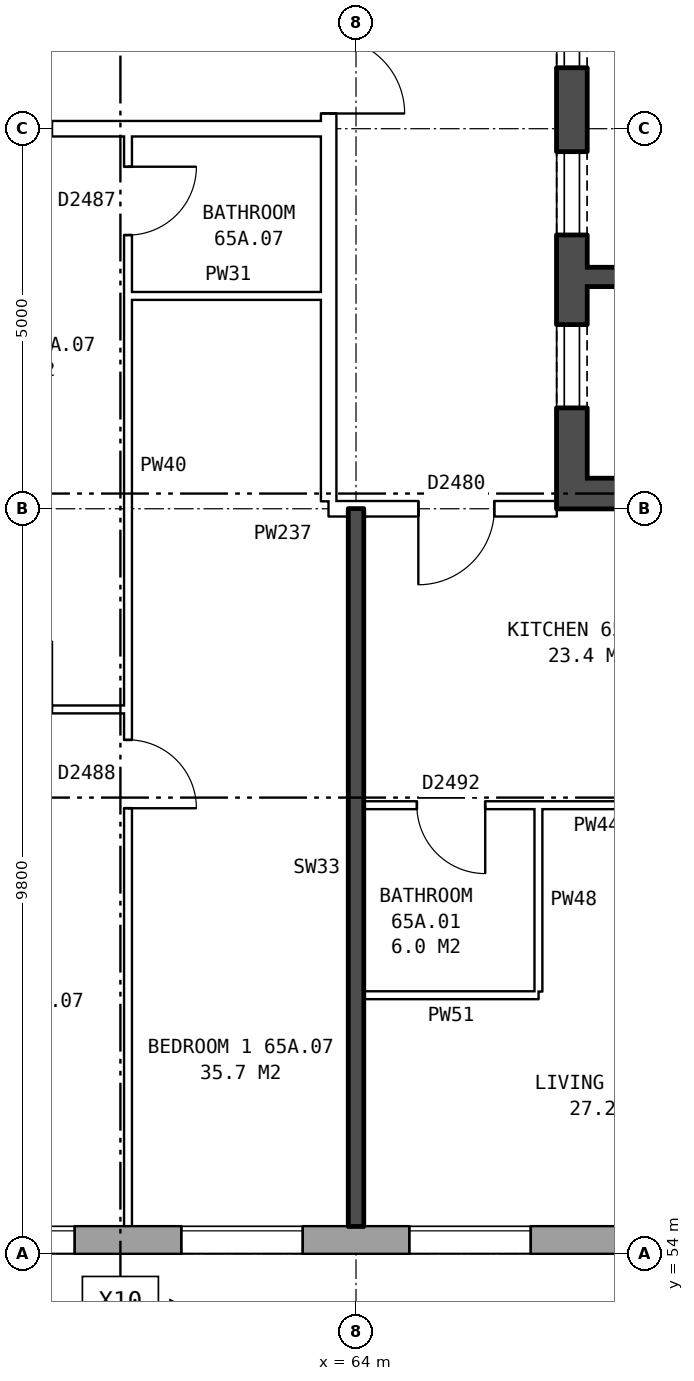
"""IFC4 building model, lengths in metres.
Left out: names, types, materials, properties, quantities, classifications, styles, units other than length and angle.
Written with IfcOpenShell. Run it as: python <this file> out.ifc"""

import sys

from ifc_helpers import new_model, si_unit, direction, frame, frame_2d, origin, place, context, subcontext, project, spatial, rectangle, extrude, element, fill, save


model = new_model("IFC4")
c1 = context("Model", 3, precision=1e-05, world=origin(), true_north=direction((0.0, 1.0)))
c2 = subcontext(c1, "Body", "Model", "MODEL_VIEW")
j1 = project(units=[si_unit("LENGTHUNIT", "METRE"), si_unit("PLANEANGLEUNIT", "RADIAN")], contexts=[c1])
p1 = place(None, origin())
s1 = spatial("IfcSite", under=j1, at=p1, CompositionType="ELEMENT")
p2 = place(p1, origin())
s2 = spatial("IfcBuilding", under=s1, at=p2, CompositionType="ELEMENT")
p3 = place(p2, frame((0.0, 0.0, 230.7)))
s3 = spatial("IfcBuildingStorey", under=s2, at=p3, CompositionType="ELEMENT", Elevation=230.7)
p4 = place(p3, frame((35.075, 54.18, 0.0), z_axis=(0.0, 0.0, 1.0), x_axis=(1.0, 0.0, 0.0)))
e1 = element("IfcWall", 1, at=p4, inside=s3, PredefinedType="STANDARD", context=c2, shape_type="SweptSolid", body=[
    extrude(rectangle(XDim=39.875, YDim=0.36, at=frame_2d((19.938, 0.0))), origin(), (0.0, 0.0, 1.0), 2.85),
])
p5 = place(p4, frame((2.625, 0.0, 0.8)))
e2 = element("IfcOpeningElement", 2, at=p5, cuts=e1, PredefinedType="OPENING", context=c2, shape_type="SweptSolid", body=[
    extrude(rectangle(XDim=1.6, YDim=1.8, at=frame_2d((0.8, 0.9))), frame((0.0, 0.19, 0.0), z_axis=(0.0, -1.0, 0.0), x_axis=(1.0, 0.0, 0.0)), (0.0, 0.0, 1.0), 0.38),
])
p6 = place(p4, frame((5.625, 0.0, 0.8)))
e3 = element("IfcOpeningElement", 3, at=p6, cuts=e1, PredefinedType="OPENING", context=c2, shape_type="SweptSolid", body=[
    extrude(rectangle(XDim=1.6, YDim=1.8, at=frame_2d((0.8, 0.9))), frame((0.0, 0.19, 0.0), z_axis=(0.0, -1.0, 0.0), x_axis=(1.0, 0.0, 0.0)), (0.0, 0.0, 1.0), 0.38),
])
p7 = place(p4, frame((8.625, 0.0, 0.8)))
e4 = element("IfcOpeningElement", 4, at=p7, cuts=e1, PredefinedType="OPENING", context=c2, shape_type="SweptSolid", body=[
    extrude(rectangle(XDim=1.6, YDim=1.8, at=frame_2d((0.8, 0.9))), frame((0.0, 0.19, 0.0), z_axis=(0.0, -1.0, 0.0), x_axis=(1.0, 0.0, 0.0)), (0.0, 0.0, 1.0), 0.38),
])
p8 = place(p4, frame((11.625, 0.0, 0.8)))
e5 = element("IfcOpeningElement", 5, at=p8, cuts=e1, PredefinedType="OPENING", context=c2, shape_type="SweptSolid", body=[
    extrude(rectangle(XDim=1.6, YDim=1.8, at=frame_2d((0.8, 0.9))), frame((0.0, 0.19, 0.0), z_axis=(0.0, -1.0, 0.0), x_axis=(1.0, 0.0, 0.0)), (0.0, 0.0, 1.0), 0.38),
])
p9 = place(p4, frame((14.075, 0.0, 0.8)))
e6 = element("IfcOpeningElement", 6, at=p9, cuts=e1, PredefinedType="OPENING", context=c2, shape_type="SweptSolid", body=[
    extrude(rectangle(XDim=1.0, YDim=1.8, at=frame_2d((0.5, 0.9))), frame((0.0, 0.19, 0.0), z_axis=(0.0, -1.0, 0.0), x_axis=(1.0, 0.0, 0.0)), (0.0, 0.0, 1.0), 0.38),
])
p10 = place(p4, frame((17.625, 0.0, 0.8)))
e7 = element("IfcOpeningElement", 7, at=p10, cuts=e1, PredefinedType="OPENING", context=c2, shape_type="SweptSolid", body=[
    extrude(rectangle(XDim=1.6, YDim=1.8, at=frame_2d((0.8, 0.9))), frame((0.0, 0.19, 0.0), z_axis=(0.0, -1.0, 0.0), x_axis=(1.0, 0.0, 0.0)), (0.0, 0.0, 1.0), 0.38),
])
p11 = place(p4, frame((20.125, 0.0, 0.8)))
e8 = element("IfcOpeningElement", 8, at=p11, cuts=e1, PredefinedType="OPENING", context=c2, shape_type="SweptSolid", body=[
    extrude(rectangle(XDim=0.6, YDim=1.2, at=frame_2d((0.3, 0.6))), frame((0.0, 0.19, 0.0), z_axis=(0.0, -1.0, 0.0), x_axis=(1.0, 0.0, 0.0)), (0.0, 0.0, 1.0), 0.38),
])
p12 = place(p4, frame((23.625, 0.0, 0.8)))
e9 = element("IfcOpeningElement", 9, at=p12, cuts=e1, PredefinedType="OPENING", context=c2, shape_type="SweptSolid", body=[
    extrude(rectangle(XDim=1.6, YDim=1.8, at=frame_2d((0.8, 0.9))), frame((0.0, 0.19, 0.0), z_axis=(0.0, -1.0, 0.0), x_axis=(1.0, 0.0, 0.0)), (0.0, 0.0, 1.0), 0.38),
])
p13 = place(p4, frame((26.625, 0.0, 0.8)))
e10 = element("IfcOpeningElement", 10, at=p13, cuts=e1, PredefinedType="OPENING", context=c2, shape_type="SweptSolid", body=[
    extrude(rectangle(XDim=1.6, YDim=1.8, at=frame_2d((0.8, 0.9))), frame((0.0, 0.19, 0.0), z_axis=(0.0, -1.0, 0.0), x_axis=(1.0, 0.0, 0.0)), (0.0, 0.0, 1.0), 0.38),
])
p14 = place(p4, frame((29.625, 0.0, 0.8)))
e11 = element("IfcOpeningElement", 11, at=p14, cuts=e1, PredefinedType="OPENING", context=c2, shape_type="SweptSolid", body=[
    extrude(rectangle(XDim=1.6, YDim=1.8, at=frame_2d((0.8, 0.9))), frame((0.0, 0.19, 0.0), z_axis=(0.0, -1.0, 0.0), x_axis=(1.0, 0.0, 0.0)), (0.0, 0.0, 1.0), 0.38),
])
p15 = place(p4, frame((32.625, 0.0, 0.8)))
e12 = element("IfcOpeningElement", 12, at=p15, cuts=e1, PredefinedType="OPENING", context=c2, shape_type="SweptSolid", body=[
    extrude(rectangle(XDim=1.6, YDim=1.8, at=frame_2d((0.8, 0.9))), frame((0.0, 0.19, 0.0), z_axis=(0.0, -1.0, 0.0), x_axis=(1.0, 0.0, 0.0)), (0.0, 0.0, 1.0), 0.38),
])
p16 = place(p4, frame((35.625, 0.0, 0.8)))
e13 = element("IfcOpeningElement", 13, at=p16, cuts=e1, PredefinedType="OPENING", context=c2, shape_type="SweptSolid", body=[
    extrude(rectangle(XDim=1.6, YDim=1.8, at=frame_2d((0.8, 0.9))), frame((0.0, 0.19, 0.0), z_axis=(0.0, -1.0, 0.0), x_axis=(1.0, 0.0, 0.0)), (0.0, 0.0, 1.0), 0.38),
])
p17 = place(p4, frame((22.125, 0.0, 1.7)))
e14 = element("IfcOpeningElement", 14, at=p17, cuts=e1, PredefinedType="OPENING", context=c2, shape_type="SweptSolid", body=[
    extrude(rectangle(XDim=0.6, YDim=0.9, at=frame_2d((0.3, 0.45))), frame((0.0, 0.19, 0.0), z_axis=(0.0, -1.0, 0.0), x_axis=(1.0, 0.0, 0.0)), (0.0, 0.0, 1.0), 0.38),
])
p18 = place(p3, frame((66.84, 63.8, 0.0), z_axis=(0.0, 0.0, 1.0), x_axis=(0.0, 1.0, 0.0)))
e15 = element("IfcWall", 15, at=p18, inside=s3, PredefinedType="SHEAR", context=c2, shape_type="SweptSolid", body=[
    extrude(rectangle(XDim=12.4, YDim=0.4, at=frame_2d((6.2, 0.0))), origin(), (0.0, 0.0, 1.0), 2.85),
])
p19 = place(p18, frame((1.325, 0.0, 0.0)))
e16 = element("IfcOpeningElement", 16, at=p19, cuts=e15, PredefinedType="OPENING", context=c2, shape_type="SweptSolid", body=[
    extrude(rectangle(XDim=1.1, YDim=2.1, at=frame_2d((0.55, 1.05))), frame((0.0, 0.21, 0.0), z_axis=(0.0, -1.0, 0.0), x_axis=(1.0, 0.0, 0.0)), (0.0, 0.0, 1.0), 0.42),
])
p20 = place(p18, frame((3.6, 0.0, 0.0)))
e17 = element("IfcOpeningElement", 17, at=p20, cuts=e15, PredefinedType="OPENING", context=c2, shape_type="SweptSolid", body=[
    extrude(rectangle(XDim=1.1, YDim=2.1, at=frame_2d((0.55, 1.05))), frame((0.0, 0.21, 0.0), z_axis=(0.0, -1.0, 0.0), x_axis=(1.0, 0.0, 0.0)), (0.0, 0.0, 1.0), 0.42),
])
p21 = place(p18, frame((5.8, 0.0, 0.0)))
e18 = element("IfcOpeningElement", 18, at=p21, cuts=e15, PredefinedType="OPENING", context=c2, shape_type="SweptSolid", body=[
    extrude(rectangle(XDim=1.1, YDim=2.1, at=frame_2d((0.55, 1.05))), frame((0.0, 0.21, 0.0), z_axis=(0.0, -1.0, 0.0), x_axis=(1.0, 0.0, 0.0)), (0.0, 0.0, 1.0), 0.42),
])
p22 = place(p18, frame((8.0, 0.0, 0.0)))
e19 = element("IfcOpeningElement", 19, at=p22, cuts=e15, PredefinedType="OPENING", context=c2, shape_type="SweptSolid", body=[
    extrude(rectangle(XDim=1.1, YDim=2.1, at=frame_2d((0.55, 1.05))), frame((0.0, 0.21, 0.0), z_axis=(0.0, -1.0, 0.0), x_axis=(1.0, 0.0, 0.0)), (0.0, 0.0, 1.0), 0.42),
])
p23 = place(p18, frame((9.9, 0.0, 0.0)))
e20 = element("IfcOpeningElement", 20, at=p23, cuts=e15, PredefinedType="OPENING", context=c2, shape_type="SweptSolid", body=[
    extrude(rectangle(XDim=1.1, YDim=2.1, at=frame_2d((0.55, 1.05))), frame((0.0, 0.21, 0.0), z_axis=(0.0, -1.0, 0.0), x_axis=(1.0, 0.0, 0.0)), (0.0, 0.0, 1.0), 0.42),
])
p24 = place(p3, frame((67.04, 64.0, 0.0), z_axis=(0.0, 0.0, 1.0), x_axis=(1.0, 0.0, 0.0)))
e21 = element("IfcWall", 21, at=p24, inside=s3, PredefinedType="SHEAR", context=c2, shape_type="SweptSolid", body=[
    extrude(rectangle(XDim=8.2, YDim=0.4, at=frame_2d((4.1, 0.0))), origin(), (0.0, 0.0, 1.0), 2.85),
])
p25 = place(p3, frame((67.04, 66.85, 0.0), z_axis=(0.0, 0.0, 1.0), x_axis=(1.0, 0.0, 0.0)))
e22 = element("IfcWall", 22, at=p25, inside=s3, PredefinedType="SHEAR", context=c2, shape_type="SweptSolid", body=[
    extrude(rectangle(XDim=3.595, YDim=0.25, at=frame_2d((1.797, 0.0))), origin(), (0.0, 0.0, 1.0), 2.85),
])
p26 = place(p3, frame((63.64, 63.9, 0.0), z_axis=(0.0, 0.0, 1.0), x_axis=(0.0, 1.0, 0.0)))
e23 = element("IfcWall", 23, at=p26, inside=s3, PredefinedType="PARTITIONING", context=c2, shape_type="SweptSolid", body=[
    extrude(rectangle(XDim=12.2, YDim=0.2, at=frame_2d((6.1, 0.0))), origin(), (0.0, 0.0, 1.0), 2.85),
])
p27 = place(p26, frame((5.1, 0.0, 0.0)))
e24 = element("IfcOpeningElement", 24, at=p27, cuts=e23, PredefinedType="OPENING", context=c2, shape_type="SweptSolid", body=[
    extrude(rectangle(XDim=2.0, YDim=2.1, at=frame_2d((1.0, 1.05))), frame((0.0, 0.11, 0.0), z_axis=(0.0, -1.0, 0.0), x_axis=(1.0, 0.0, 0.0)), (0.0, 0.0, 1.0), 0.22),
])
p28 = place(p3, frame((64.1, 57.4, 0.0), z_axis=(0.0, 0.0, 1.0), x_axis=(1.0, 0.0, 0.0)))
e25 = element("IfcWall", 25, at=p28, inside=s3, PredefinedType="PARTITIONING", context=c2, shape_type="SweptSolid", body=[
    extrude(rectangle(XDim=2.3, YDim=0.1, at=frame_2d((1.15, 0.0))), origin(), (0.0, 0.0, 1.0), 2.85),
])
p29 = place(p3, frame((64.1, 59.9, 0.0), z_axis=(0.0, 0.0, 1.0), x_axis=(1.0, 0.0, 0.0)))
e26 = element("IfcWall", 26, at=p29, inside=s3, PredefinedType="PARTITIONING", context=c2, shape_type="SweptSolid", body=[
    extrude(rectangle(XDim=5.8, YDim=0.1, at=frame_2d((2.9, 0.0))), origin(), (0.0, 0.0, 1.0), 2.85),
])
p30 = place(p29, frame((3.6, 0.0, 0.0)))
e27 = element("IfcOpeningElement", 27, at=p30, cuts=e26, PredefinedType="OPENING", context=c2, shape_type="SweptSolid", body=[
    extrude(rectangle(XDim=0.9, YDim=2.1, at=frame_2d((0.45, 1.05))), frame((0.0, 0.06, 0.0), z_axis=(0.0, -1.0, 0.0), x_axis=(1.0, 0.0, 0.0)), (0.0, 0.0, 1.0), 0.12),
])
p31 = place(p29, frame((0.7, 0.0, 0.0)))
e28 = element("IfcOpeningElement", 28, at=p31, cuts=e26, PredefinedType="OPENING", context=c2, shape_type="SweptSolid", body=[
    extrude(rectangle(XDim=0.9, YDim=2.1, at=frame_2d((0.45, 1.05))), frame((0.0, 0.06, 0.0), z_axis=(0.0, -1.0, 0.0), x_axis=(1.0, 0.0, 0.0)), (0.0, 0.0, 1.0), 0.12),
])
p32 = place(p3, frame((58.1, 61.16, 0.0), z_axis=(0.0, 0.0, 1.0), x_axis=(1.0, 0.0, 0.0)))
e29 = element("IfcWall", 29, at=p32, inside=s3, PredefinedType="PARTITIONING", context=c2, shape_type="SweptSolid", body=[
    extrude(rectangle(XDim=2.9, YDim=0.1, at=frame_2d((1.45, 0.0))), origin(), (0.0, 0.0, 1.0), 2.85),
])
p33 = place(p32, frame((1.0, 0.0, 0.0)))
e30 = element("IfcOpeningElement", 30, at=p33, cuts=e29, PredefinedType="OPENING", context=c2, shape_type="SweptSolid", body=[
    extrude(rectangle(XDim=0.9, YDim=2.1, at=frame_2d((0.45, 1.05))), frame((0.0, 0.06, 0.0), z_axis=(0.0, -1.0, 0.0), x_axis=(1.0, 0.0, 0.0)), (0.0, 0.0, 1.0), 0.12),
])
p34 = place(p3, frame((63.64, 63.8, 0.0), z_axis=(0.0, 0.0, 1.0), x_axis=(1.0, 0.0, 0.0)))
e31 = element("IfcWall", 31, at=p34, inside=s3, PredefinedType="PARTITIONING", context=c2, shape_type="SweptSolid", body=[
    extrude(rectangle(XDim=3.0, YDim=0.2, at=frame_2d((1.5, 0.0))), origin(), (0.0, 0.0, 1.0), 2.85),
])
p35 = place(p34, frame((1.18, 0.0, 0.0)))
e32 = element("IfcOpeningElement", 32, at=p35, cuts=e31, PredefinedType="OPENING", context=c2, shape_type="SweptSolid", body=[
    extrude(rectangle(XDim=1.0, YDim=2.1, at=frame_2d((0.5, 1.05))), frame((0.0, 0.11, 0.0), z_axis=(0.0, -1.0, 0.0), x_axis=(1.0, 0.0, 0.0)), (0.0, 0.0, 1.0), 0.22),
])
p36 = place(p3, frame((61.0, 66.6, 0.0), z_axis=(0.0, 0.0, 1.0), x_axis=(1.0, 0.0, 0.0)))
e33 = element("IfcWall", 33, at=p36, inside=s3, PredefinedType="PARTITIONING", context=c2, shape_type="SweptSolid", body=[
    extrude(rectangle(XDim=2.64, YDim=0.1, at=frame_2d((1.32, 0.0))), origin(), (0.0, 0.0, 1.0), 2.85),
])
p37 = place(p3, frame((44.36, 68.8, 0.0), z_axis=(0.0, 0.0, 1.0), x_axis=(1.0, 0.0, 0.0)))
e34 = element("IfcWall", 34, at=p37, inside=s3, PredefinedType="PARTITIONING", context=c2, shape_type="SweptSolid", body=[
    extrude(rectangle(XDim=19.28, YDim=0.2, at=frame_2d((9.64, 0.0))), origin(), (0.0, 0.0, 1.0), 2.85),
])
p38 = place(p37, frame((14.64, 0.0, 0.0)))
e35 = element("IfcOpeningElement", 35, at=p38, cuts=e34, PredefinedType="OPENING", context=c2, shape_type="SweptSolid", body=[
    extrude(rectangle(XDim=1.0, YDim=2.1, at=frame_2d((0.5, 1.05))), frame((0.0, 0.11, 0.0), z_axis=(0.0, -1.0, 0.0), x_axis=(1.0, 0.0, 0.0)), (0.0, 0.0, 1.0), 0.22),
])
p39 = place(p37, frame((5.64, 0.0, 0.0)))
e36 = element("IfcOpeningElement", 36, at=p39, cuts=e34, PredefinedType="OPENING", context=c2, shape_type="SweptSolid", body=[
    extrude(rectangle(XDim=1.0, YDim=2.1, at=frame_2d((0.5, 1.05))), frame((0.0, 0.11, 0.0), z_axis=(0.0, -1.0, 0.0), x_axis=(1.0, 0.0, 0.0)), (0.0, 0.0, 1.0), 0.22),
])
p40 = place(p3, frame((61.0, 54.36, 0.0), z_axis=(0.0, 0.0, 1.0), x_axis=(0.0, 1.0, 0.0)))
e37 = element("IfcWall", 37, at=p40, inside=s3, PredefinedType="PARTITIONING", context=c2, shape_type="SweptSolid", body=[
    extrude(rectangle(XDim=14.34, YDim=0.1, at=frame_2d((7.17, 0.0))), origin(), (0.0, 0.0, 1.0), 2.85),
])
p41 = place(p40, frame((5.5, 0.0, 0.0)))
e38 = element("IfcOpeningElement", 38, at=p41, cuts=e37, PredefinedType="OPENING", context=c2, shape_type="SweptSolid", body=[
    extrude(rectangle(XDim=0.9, YDim=2.1, at=frame_2d((0.45, 1.05))), frame((0.0, 0.06, 0.0), z_axis=(0.0, -1.0, 0.0), x_axis=(1.0, 0.0, 0.0)), (0.0, 0.0, 1.0), 0.12),
])
p42 = place(p40, frame((13.04, 0.0, 0.0)))
e39 = element("IfcOpeningElement", 39, at=p42, cuts=e37, PredefinedType="OPENING", context=c2, shape_type="SweptSolid", body=[
    extrude(rectangle(XDim=0.9, YDim=2.1, at=frame_2d((0.45, 1.05))), frame((0.0, 0.06, 0.0), z_axis=(0.0, -1.0, 0.0), x_axis=(1.0, 0.0, 0.0)), (0.0, 0.0, 1.0), 0.12),
])
p43 = place(p3, frame((64.0, 54.36, 0.0), z_axis=(0.0, 0.0, 1.0), x_axis=(0.0, 1.0, 0.0)))
e40 = element("IfcWall", 40, at=p43, inside=s3, PredefinedType="SOLIDWALL", context=c2, shape_type="SweptSolid", body=[
    extrude(rectangle(XDim=9.44, YDim=0.2, at=frame_2d((4.72, 0.0))), origin(), (0.0, 0.0, 1.0), 2.85),
])
p44 = place(p3, frame((66.4, 57.45, 0.0), z_axis=(0.0, 0.0, 1.0), x_axis=(0.0, 1.0, 0.0)))
e41 = element("IfcWall", 41, at=p44, inside=s3, PredefinedType="PARTITIONING", context=c2, shape_type="SweptSolid", body=[
    extrude(rectangle(XDim=2.4, YDim=0.1, at=frame_2d((1.2, 0.0))), origin(), (0.0, 0.0, 1.0), 2.85),
])
p45 = place(p12, origin())
e42 = element("IfcWindow", 42, at=p45, inside=s3, PartitioningType="SINGLE_PANEL", PredefinedType="WINDOW", context=c2, shape_type="SweptSolid", body=[
    extrude(rectangle(XDim=1.6, YDim=1.8, at=frame_2d((0.8, 0.9))), frame((0.0, 0.15, 0.0), z_axis=(0.0, -1.0, 0.0), x_axis=(1.0, 0.0, 0.0)), (0.0, 0.0, 1.0), 0.06),
])
fill(e9, e42)
p46 = place(p13, origin())
e43 = element("IfcWindow", 43, at=p46, inside=s3, PartitioningType="SINGLE_PANEL", PredefinedType="WINDOW", context=c2, shape_type="SweptSolid", body=[
    extrude(rectangle(XDim=1.6, YDim=1.8, at=frame_2d((0.8, 0.9))), frame((0.0, 0.15, 0.0), z_axis=(0.0, -1.0, 0.0), x_axis=(1.0, 0.0, 0.0)), (0.0, 0.0, 1.0), 0.06),
])
fill(e10, e43)
p47 = place(p14, origin())
e44 = element("IfcWindow", 44, at=p47, inside=s3, PartitioningType="SINGLE_PANEL", PredefinedType="WINDOW", context=c2, shape_type="SweptSolid", body=[
    extrude(rectangle(XDim=1.6, YDim=1.8, at=frame_2d((0.8, 0.9))), frame((0.0, 0.15, 0.0), z_axis=(0.0, -1.0, 0.0), x_axis=(1.0, 0.0, 0.0)), (0.0, 0.0, 1.0), 0.06),
])
fill(e11, e44)
p48 = place(p19, origin())
e45 = element("IfcDoor", 45, at=p48, inside=s3, OperationType="DOUBLE_DOOR_SLIDING", PredefinedType="DOOR", context=c2, shape_type="SweptSolid", body=[
    extrude(rectangle(XDim=1.1, YDim=2.1, at=frame_2d((0.55, 1.05))), frame((0.0, -0.135, 0.0), z_axis=(0.0, -1.0, 0.0), x_axis=(1.0, 0.0, 0.0)), (0.0, 0.0, 1.0), 0.05),
])
fill(e16, e45)
p49 = place(p20, origin())
e46 = element("IfcDoor", 46, at=p49, inside=s3, OperationType="DOUBLE_DOOR_SLIDING", PredefinedType="DOOR", context=c2, shape_type="SweptSolid", body=[
    extrude(rectangle(XDim=1.1, YDim=2.1, at=frame_2d((0.55, 1.05))), frame((0.0, -0.135, 0.0), z_axis=(0.0, -1.0, 0.0), x_axis=(1.0, 0.0, 0.0)), (0.0, 0.0, 1.0), 0.05),
])
fill(e17, e46)
p50 = place(p21, origin())
e47 = element("IfcDoor", 47, at=p50, inside=s3, OperationType="DOUBLE_DOOR_SLIDING", PredefinedType="DOOR", context=c2, shape_type="SweptSolid", body=[
    extrude(rectangle(XDim=1.1, YDim=2.1, at=frame_2d((0.55, 1.05))), frame((0.0, -0.135, 0.0), z_axis=(0.0, -1.0, 0.0), x_axis=(1.0, 0.0, 0.0)), (0.0, 0.0, 1.0), 0.05),
])
fill(e18, e47)
p51 = place(p27, frame((2.0, 0.0, 0.0), z_axis=(0.0, 0.0, 1.0), x_axis=(-1.0, 0.0, 0.0)))
e48 = element("IfcDoor", 48, at=p51, inside=s3, OperationType="DOUBLE_DOOR_SINGLE_SWING", PredefinedType="DOOR", context=c2, shape_type="SweptSolid", body=[
    extrude(rectangle(XDim=2.0, YDim=2.1, at=frame_2d((1.0, 1.05))), frame((0.0, 0.025, 0.0), z_axis=(0.0, -1.0, 0.0), x_axis=(1.0, 0.0, 0.0)), (0.0, 0.0, 1.0), 0.05),
])
fill(e24, e48)
p52 = place(p35, frame((1.0, 0.0, 0.0), z_axis=(0.0, 0.0, 1.0), x_axis=(-1.0, 0.0, 0.0)))
e49 = element("IfcDoor", 49, at=p52, inside=s3, OperationType="SINGLE_SWING_RIGHT", PredefinedType="DOOR", context=c2, shape_type="SweptSolid", body=[
    extrude(rectangle(XDim=1.0, YDim=2.1, at=frame_2d((0.5, 1.05))), frame((0.0, 0.025, 0.0), z_axis=(0.0, -1.0, 0.0), x_axis=(1.0, 0.0, 0.0)), (0.0, 0.0, 1.0), 0.05),
])
fill(e32, e49)
p53 = place(p31, frame((0.9, 0.0, 0.0), z_axis=(0.0, 0.0, 1.0), x_axis=(-1.0, 0.0, 0.0)))
e50 = element("IfcDoor", 50, at=p53, inside=s3, OperationType="SINGLE_SWING_LEFT", PredefinedType="DOOR", context=c2, shape_type="SweptSolid", body=[
    extrude(rectangle(XDim=0.9, YDim=2.1, at=frame_2d((0.45, 1.05))), frame((0.0, 0.025, 0.0), z_axis=(0.0, -1.0, 0.0), x_axis=(1.0, 0.0, 0.0)), (0.0, 0.0, 1.0), 0.05),
])
fill(e28, e50)
p54 = place(p41, frame((0.9, 0.0, 0.0), z_axis=(0.0, 0.0, 1.0), x_axis=(-1.0, 0.0, 0.0)))
e51 = element("IfcDoor", 51, at=p54, inside=s3, OperationType="SINGLE_SWING_RIGHT", PredefinedType="DOOR", context=c2, shape_type="SweptSolid", body=[
    extrude(rectangle(XDim=0.9, YDim=2.1, at=frame_2d((0.45, 1.05))), frame((0.0, 0.025, 0.0), z_axis=(0.0, -1.0, 0.0), x_axis=(1.0, 0.0, 0.0)), (0.0, 0.0, 1.0), 0.05),
])
fill(e38, e51)
p55 = place(p42, frame((0.9, 0.0, 0.0), z_axis=(0.0, 0.0, 1.0), x_axis=(-1.0, 0.0, 0.0)))
e52 = element("IfcDoor", 52, at=p55, inside=s3, OperationType="SINGLE_SWING_LEFT", PredefinedType="DOOR", context=c2, shape_type="SweptSolid", body=[
    extrude(rectangle(XDim=0.9, YDim=2.1, at=frame_2d((0.45, 1.05))), frame((0.0, 0.025, 0.0), z_axis=(0.0, -1.0, 0.0), x_axis=(1.0, 0.0, 0.0)), (0.0, 0.0, 1.0), 0.05),
])
fill(e39, e52)
save(model, sys.argv[1])
